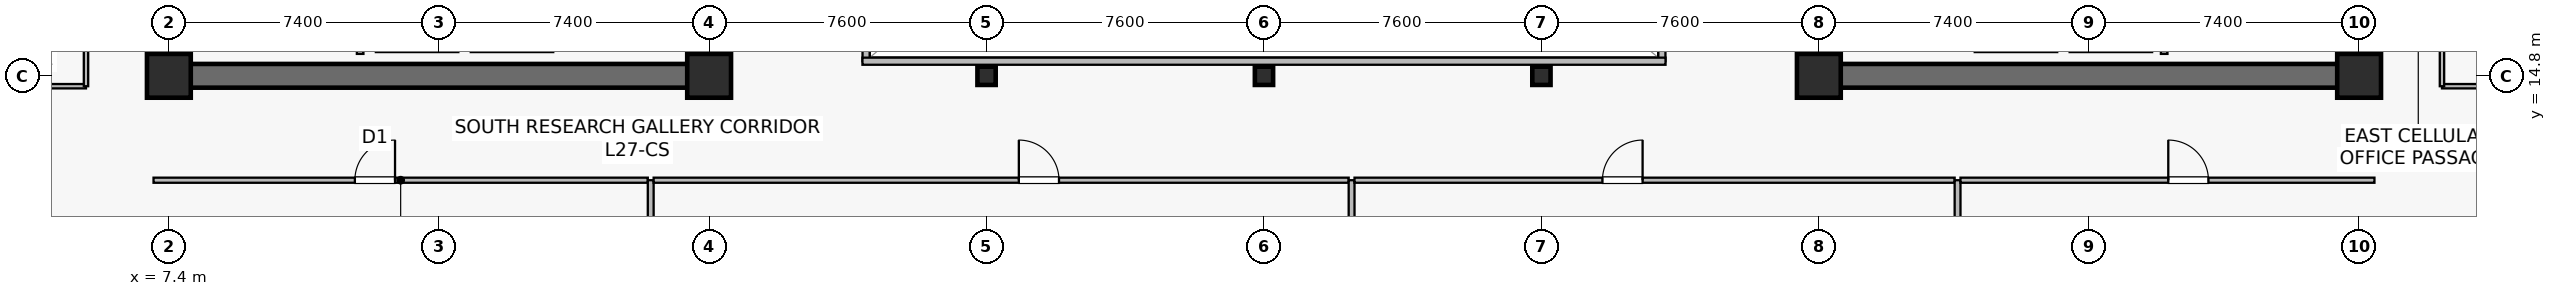
"""IFC4 building model, lengths in metres.
Left out: names, types, materials, properties, quantities, classifications, styles, units other than length and angle.
Written with IfcOpenShell. Run it as: python <this file> out.ifc"""

import sys

from ifc_helpers import new_model, si_unit, direction, frame, frame_2d, origin, origin_2d, place, context, subcontext, project, spatial, rectangle, hollow_rectangle, extrude, source, transform, mapped, element, fill, save


model = new_model("IFC4")
c1 = context("Model", 3, precision=1e-05, world=origin(), true_north=direction((0.0, 1.0)))
c2 = subcontext(c1, "Body", "Model", "MODEL_VIEW")
j1 = project(units=[si_unit("LENGTHUNIT", "METRE"), si_unit("PLANEANGLEUNIT", "RADIAN")], contexts=[c1])
p1 = place(None, origin())
s1 = spatial("IfcSite", under=j1, at=p1, CompositionType="ELEMENT")
p2 = place(p1, origin())
s2 = spatial("IfcBuilding", under=s1, at=p2, CompositionType="ELEMENT")
p3 = place(p2, frame((0.0, 0.0, 113.3)))
s3 = spatial("IfcBuildingStorey", under=s2, at=p3, CompositionType="ELEMENT", Elevation=113.3)
p4 = place(p3, frame((7.075, 14.8, 0.0), z_axis=(0.0, 0.0, 1.0), x_axis=(1.0, 0.0, 0.0)))
e1 = element("IfcWall", 1, at=p4, inside=s3, PredefinedType="SHEAR", context=c2, shape_type="SweptSolid", body=[
    extrude(rectangle(XDim=15.45, YDim=0.65, at=frame_2d((7.725, 0.0))), origin(), (0.0, 0.0, 1.0), 3.79),
])
p5 = place(p3, frame((7.4, 15.125, 0.0), z_axis=(0.0, 0.0, 1.0), x_axis=(0.0, 1.0, 0.0)))
e2 = element("IfcWall", 2, at=p5, inside=s3, PredefinedType="SHEAR", context=c2, shape_type="SweptSolid", body=[
    extrude(rectangle(XDim=18.35, YDim=0.65, at=frame_2d((9.175, 0.0))), origin(), (0.0, 0.0, 1.0), 3.79),
])
p6 = place(p3, frame((22.2, 15.125, 0.0), z_axis=(0.0, 0.0, 1.0), x_axis=(0.0, 1.0, 0.0)))
e3 = element("IfcWall", 3, at=p6, inside=s3, PredefinedType="SHEAR", context=c2, shape_type="SweptSolid", body=[
    extrude(rectangle(XDim=18.35, YDim=0.65, at=frame_2d((9.175, 0.0))), origin(), (0.0, 0.0, 1.0), 3.79),
])
p7 = place(p6, frame((3.425, 0.0, 0.0)))
e4 = element("IfcOpeningElement", 4, at=p7, cuts=e3, PredefinedType="OPENING", context=c2, shape_type="SweptSolid", body=[
    extrude(rectangle(XDim=1.42, YDim=2.2, at=frame_2d((0.71, 1.1))), frame((0.0, 0.335, 0.0), z_axis=(0.0, -1.0, 0.0), x_axis=(1.0, 0.0, 0.0)), (0.0, 0.0, 1.0), 0.67),
])
p8 = place(p3, frame((52.275, 14.8, 0.0), z_axis=(0.0, 0.0, 1.0), x_axis=(1.0, 0.0, 0.0)))
e5 = element("IfcWall", 5, at=p8, inside=s3, PredefinedType="SHEAR", context=c2, shape_type="SweptSolid", body=[
    extrude(rectangle(XDim=15.45, YDim=0.65, at=frame_2d((7.725, 0.0))), origin(), (0.0, 0.0, 1.0), 3.79),
])
p9 = place(p3, frame((52.6, 15.125, 0.0), z_axis=(0.0, 0.0, 1.0), x_axis=(0.0, 1.0, 0.0)))
e6 = element("IfcWall", 6, at=p9, inside=s3, PredefinedType="SHEAR", context=c2, shape_type="SweptSolid", body=[
    extrude(rectangle(XDim=18.35, YDim=0.65, at=frame_2d((9.175, 0.0))), origin(), (0.0, 0.0, 1.0), 3.79),
])
p10 = place(p9, frame((3.425, 0.0, 0.0)))
e7 = element("IfcOpeningElement", 7, at=p10, cuts=e6, PredefinedType="OPENING", context=c2, shape_type="SweptSolid", body=[
    extrude(rectangle(XDim=1.42, YDim=2.2, at=frame_2d((0.71, 1.1))), frame((0.0, 0.335, 0.0), z_axis=(0.0, -1.0, 0.0), x_axis=(1.0, 0.0, 0.0)), (0.0, 0.0, 1.0), 0.67),
])
p11 = place(p3, frame((67.4, 15.125, 0.0), z_axis=(0.0, 0.0, 1.0), x_axis=(0.0, 1.0, 0.0)))
e8 = element("IfcWall", 8, at=p11, inside=s3, PredefinedType="SHEAR", context=c2, shape_type="SweptSolid", body=[
    extrude(rectangle(XDim=18.35, YDim=0.65, at=frame_2d((9.175, 0.0))), origin(), (0.0, 0.0, 1.0), 3.79),
])
m1 = source(origin(), c2, "Body", "SweptSolid", [
    extrude(rectangle(XDim=1.2, YDim=1.2, at=origin_2d()), origin(), (0.0, 0.0, 1.0), 4.1),
])
for number, where, z_axis, x_axis in (
    (9, (7.4, 14.8, 0.0), (0.0, 0.0, 1.0), (1.0, 0.0, 0.0)),
    (10, (22.2, 14.8, 0.0), (0.0, 0.0, 1.0), (1.0, 0.0, 0.0)),
    (11, (52.6, 14.8, 0.0), (0.0, 0.0, 1.0), (1.0, 0.0, 0.0)),
    (12, (67.4, 14.8, 0.0), (0.0, 0.0, 1.0), (1.0, 0.0, 0.0)),
):
    element("IfcColumn", number, at=place(p3, frame(where, z_axis=z_axis, x_axis=x_axis)), inside=s3, PredefinedType="COLUMN", context=c2, shape_type="MappedRepresentation", body=[
        mapped(m1, transform((0.0, 0.0, 0.0), scale=1.0)),
    ])
m2 = source(origin(), c2, "Body", "SweptSolid", [
    extrude(hollow_rectangle(XDim=0.5, YDim=0.5, WallThickness=0.022, at=origin_2d()), origin(), (0.0, 0.0, 1.0), 4.1),
])
for number, where, z_axis, x_axis in (
    (13, (29.8, 14.8, 0.0), (0.0, 0.0, 1.0), (1.0, 0.0, 0.0)),
    (14, (37.4, 14.8, 0.0), (0.0, 0.0, 1.0), (1.0, 0.0, 0.0)),
    (15, (45.0, 14.8, 0.0), (0.0, 0.0, 1.0), (1.0, 0.0, 0.0)),
):
    element("IfcColumn", number, at=place(p3, frame(where, z_axis=z_axis, x_axis=x_axis)), inside=s3, PredefinedType="COLUMN", context=c2, shape_type="MappedRepresentation", body=[
        mapped(m2, transform((0.0, 0.0, 0.0), scale=1.0)),
    ])
p12 = place(p3, frame((13.07, 15.55, 0.0), z_axis=(0.0, 0.0, 1.0), x_axis=(1.0, 0.0, 0.0)))
e16 = element("IfcWall", 16, at=p12, inside=s3, PredefinedType="SOLIDWALL", context=c2, shape_type="SweptSolid", body=[
    extrude(rectangle(XDim=2.26, YDim=0.2, at=frame_2d((1.13, 0.0))), origin(), (0.0, 0.0, 1.0), 3.125),
])
p13 = place(p3, frame((15.67, 15.55, 0.0), z_axis=(0.0, 0.0, 1.0), x_axis=(1.0, 0.0, 0.0)))
e17 = element("IfcWall", 17, at=p13, inside=s3, PredefinedType="SOLIDWALL", context=c2, shape_type="SweptSolid", body=[
    extrude(rectangle(XDim=2.26, YDim=0.2, at=frame_2d((1.13, 0.0))), origin(), (0.0, 0.0, 1.0), 3.79),
])
p14 = place(p3, frame((12.64, 15.4, 0.0), z_axis=(0.0, 0.0, 1.0), x_axis=(0.0, 1.0, 0.0)))
e18 = element("IfcWall", 18, at=p14, inside=s3, PredefinedType="SOLIDWALL", context=c2, shape_type="SweptSolid", body=[
    extrude(rectangle(XDim=2.4, YDim=0.18, at=frame_2d((1.2, 0.0))), origin(), (0.0, 0.0, 1.0), 3.79),
])
p15 = place(p3, frame((59.47, 15.55, 0.0), z_axis=(0.0, 0.0, 1.0), x_axis=(1.0, 0.0, 0.0)))
e19 = element("IfcWall", 19, at=p15, inside=s3, PredefinedType="SOLIDWALL", context=c2, shape_type="SweptSolid", body=[
    extrude(rectangle(XDim=2.26, YDim=0.2, at=frame_2d((1.13, 0.0))), origin(), (0.0, 0.0, 1.0), 3.125),
])
p16 = place(p3, frame((56.87, 15.55, 0.0), z_axis=(0.0, 0.0, 1.0), x_axis=(1.0, 0.0, 0.0)))
e20 = element("IfcWall", 20, at=p16, inside=s3, PredefinedType="SOLIDWALL", context=c2, shape_type="SweptSolid", body=[
    extrude(rectangle(XDim=2.26, YDim=0.2, at=frame_2d((1.13, 0.0))), origin(), (0.0, 0.0, 1.0), 3.79),
])
p17 = place(p3, frame((62.06, 15.4, 0.0), z_axis=(0.0, 0.0, 1.0), x_axis=(0.0, 1.0, 0.0)))
e21 = element("IfcWall", 21, at=p17, inside=s3, PredefinedType="SOLIDWALL", context=c2, shape_type="SweptSolid", body=[
    extrude(rectangle(XDim=2.4, YDim=0.18, at=frame_2d((1.2, 0.0))), origin(), (0.0, 0.0, 1.0), 3.79),
])
p18 = place(p3, frame((26.5, 15.2, 0.0), z_axis=(0.0, 0.0, 1.0), x_axis=(0.0, 1.0, 0.0)))
e22 = element("IfcWall", 22, at=p18, inside=s3, PredefinedType="SOLIDWALL", context=c2, shape_type="SweptSolid", body=[
    extrude(rectangle(XDim=18.2, YDim=0.195, at=frame_2d((9.1, 0.0))), origin(), (0.0, 0.0, 1.0), 3.79),
])
p19 = place(p18, frame((1.8, 0.0, 0.9)))
e23 = element("IfcOpeningElement", 23, at=p19, cuts=e22, PredefinedType="OPENING", context=c2, shape_type="SweptSolid", body=[
    extrude(rectangle(XDim=1.2, YDim=1.35, at=frame_2d((0.6, 0.675))), frame((0.0, 0.107, 0.0), z_axis=(0.0, -1.0, 0.0), x_axis=(1.0, 0.0, 0.0)), (0.0, 0.0, 1.0), 0.215),
])
p20 = place(p18, frame((13.2, 0.0, 0.9)))
e24 = element("IfcOpeningElement", 24, at=p20, cuts=e22, PredefinedType="OPENING", context=c2, shape_type="SweptSolid", body=[
    extrude(rectangle(XDim=1.2, YDim=1.35, at=frame_2d((0.6, 0.675))), frame((0.0, 0.107, 0.0), z_axis=(0.0, -1.0, 0.0), x_axis=(1.0, 0.0, 0.0)), (0.0, 0.0, 1.0), 0.215),
])
p21 = place(p3, frame((48.3, 15.2, 0.0), z_axis=(0.0, 0.0, 1.0), x_axis=(0.0, 1.0, 0.0)))
e25 = element("IfcWall", 25, at=p21, inside=s3, PredefinedType="SOLIDWALL", context=c2, shape_type="SweptSolid", body=[
    extrude(rectangle(XDim=18.2, YDim=0.195, at=frame_2d((9.1, 0.0))), origin(), (0.0, 0.0, 1.0), 3.79),
])
p22 = place(p21, frame((1.8, 0.0, 0.9)))
e26 = element("IfcOpeningElement", 26, at=p22, cuts=e25, PredefinedType="OPENING", context=c2, shape_type="SweptSolid", body=[
    extrude(rectangle(XDim=1.2, YDim=1.35, at=frame_2d((0.6, 0.675))), frame((0.0, 0.107, 0.0), z_axis=(0.0, -1.0, 0.0), x_axis=(1.0, 0.0, 0.0)), (0.0, 0.0, 1.0), 0.215),
])
p23 = place(p21, frame((13.2, 0.0, 0.9)))
e27 = element("IfcOpeningElement", 27, at=p23, cuts=e25, PredefinedType="OPENING", context=c2, shape_type="SweptSolid", body=[
    extrude(rectangle(XDim=1.2, YDim=1.35, at=frame_2d((0.6, 0.675))), frame((0.0, 0.107, 0.0), z_axis=(0.0, -1.0, 0.0), x_axis=(1.0, 0.0, 0.0)), (0.0, 0.0, 1.0), 0.215),
])
p24 = place(p3, frame((26.4, 15.2, 0.0), z_axis=(0.0, 0.0, 1.0), x_axis=(1.0, 0.0, 0.0)))
e28 = element("IfcWall", 28, at=p24, inside=s3, PredefinedType="SOLIDWALL", context=c2, shape_type="SweptSolid", body=[
    extrude(rectangle(XDim=22.0, YDim=0.195, at=frame_2d((11.0, 0.0))), origin(), (0.0, 0.0, 1.0), 3.79),
])
p25 = place(p3, frame((6.98, 11.94, 0.0), z_axis=(0.0, 0.0, 1.0), x_axis=(1.0, 0.0, 0.0)))
e29 = element("IfcWall", 29, at=p25, inside=s3, PredefinedType="PARTITIONING", context=c2, shape_type="SweptSolid", body=[
    extrude(rectangle(XDim=13.54, YDim=0.14, at=frame_2d((6.77, 0.0))), origin(), (0.0, 0.0, 1.0), 3.125),
])
p26 = place(p25, frame((5.516, 0.0, 0.0)))
e30 = element("IfcOpeningElement", 30, at=p26, cuts=e29, PredefinedType="OPENING", context=c2, shape_type="SweptSolid", body=[
    extrude(rectangle(XDim=1.1, YDim=2.18, at=frame_2d((0.55, 1.09))), frame((0.0, 0.08, 0.0), z_axis=(0.0, -1.0, 0.0), x_axis=(1.0, 0.0, 0.0)), (0.0, 0.0, 1.0), 0.16),
])
p27 = place(p3, frame((20.6, 1.41, 0.0), z_axis=(0.0, 0.0, 1.0), x_axis=(0.0, 1.0, 0.0)))
e31 = element("IfcWall", 31, at=p27, inside=s3, PredefinedType="PARTITIONING", context=c2, shape_type="SweptSolid", body=[
    extrude(rectangle(XDim=10.53, YDim=0.16, at=frame_2d((5.265, 0.0))), origin(), (0.0, 0.0, 1.0), 3.075),
])
p28 = place(p3, frame((20.68, 11.94, 0.0), z_axis=(0.0, 0.0, 1.0), x_axis=(1.0, 0.0, 0.0)))
e32 = element("IfcWall", 32, at=p28, inside=s3, PredefinedType="PARTITIONING", context=c2, shape_type="SweptSolid", body=[
    extrude(rectangle(XDim=19.04, YDim=0.14, at=frame_2d((9.52, 0.0))), origin(), (0.0, 0.0, 1.0), 3.125),
])
p29 = place(p28, frame((10.004, 0.0, 0.0)))
e33 = element("IfcOpeningElement", 33, at=p29, cuts=e32, PredefinedType="OPENING", context=c2, shape_type="SweptSolid", body=[
    extrude(rectangle(XDim=1.1, YDim=2.18, at=frame_2d((0.55, 1.09))), frame((0.0, 0.08, 0.0), z_axis=(0.0, -1.0, 0.0), x_axis=(1.0, 0.0, 0.0)), (0.0, 0.0, 1.0), 0.16),
])
p30 = place(p3, frame((39.8, 2.61, 0.0), z_axis=(0.0, 0.0, 1.0), x_axis=(0.0, 1.0, 0.0)))
e34 = element("IfcWall", 34, at=p30, inside=s3, PredefinedType="PARTITIONING", context=c2, shape_type="SweptSolid", body=[
    extrude(rectangle(XDim=9.33, YDim=0.16, at=frame_2d((4.665, 0.0))), origin(), (0.0, 0.0, 1.0), 3.075),
])
p31 = place(p3, frame((39.88, 11.94, 0.0), z_axis=(0.0, 0.0, 1.0), x_axis=(1.0, 0.0, 0.0)))
e35 = element("IfcWall", 35, at=p31, inside=s3, PredefinedType="PARTITIONING", context=c2, shape_type="SweptSolid", body=[
    extrude(rectangle(XDim=16.44, YDim=0.14, at=frame_2d((8.22, 0.0))), origin(), (0.0, 0.0, 1.0), 3.125),
])
p32 = place(p31, frame((6.792, 0.0, 0.0)))
e36 = element("IfcOpeningElement", 36, at=p32, cuts=e35, PredefinedType="OPENING", context=c2, shape_type="SweptSolid", body=[
    extrude(rectangle(XDim=1.1, YDim=2.18, at=frame_2d((0.55, 1.09))), frame((0.0, 0.08, 0.0), z_axis=(0.0, -1.0, 0.0), x_axis=(1.0, 0.0, 0.0)), (0.0, 0.0, 1.0), 0.16),
])
p33 = place(p3, frame((56.4, 1.41, 0.0), z_axis=(0.0, 0.0, 1.0), x_axis=(0.0, 1.0, 0.0)))
e37 = element("IfcWall", 37, at=p33, inside=s3, PredefinedType="PARTITIONING", context=c2, shape_type="SweptSolid", body=[
    extrude(rectangle(XDim=10.53, YDim=0.16, at=frame_2d((5.265, 0.0))), origin(), (0.0, 0.0, 1.0), 3.075),
])
p34 = place(p3, frame((56.48, 11.94, 0.0), z_axis=(0.0, 0.0, 1.0), x_axis=(1.0, 0.0, 0.0)))
e38 = element("IfcWall", 38, at=p34, inside=s3, PredefinedType="PARTITIONING", context=c2, shape_type="SweptSolid", body=[
    extrude(rectangle(XDim=11.34, YDim=0.14, at=frame_2d((5.67, 0.0))), origin(), (0.0, 0.0, 1.0), 3.125),
])
p35 = place(p34, frame((5.692, 0.0, 0.0)))
e39 = element("IfcOpeningElement", 39, at=p35, cuts=e38, PredefinedType="OPENING", context=c2, shape_type="SweptSolid", body=[
    extrude(rectangle(XDim=1.1, YDim=2.18, at=frame_2d((0.55, 1.09))), frame((0.0, 0.08, 0.0), z_axis=(0.0, -1.0, 0.0), x_axis=(1.0, 0.0, 0.0)), (0.0, 0.0, 1.0), 0.16),
])
p36 = place(p3, frame((2.11, 14.515, 0.0), z_axis=(0.0, 0.0, 1.0), x_axis=(1.0, 0.0, 0.0)))
e40 = element("IfcWall", 40, at=p36, inside=s3, PredefinedType="PARTITIONING", context=c2, shape_type="SweptSolid", body=[
    extrude(rectangle(XDim=3.02, YDim=0.12, at=frame_2d((1.51, 0.0))), origin(), (0.0, 0.0, 1.0), 3.79),
])
p37 = place(p3, frame((5.13, 14.515, 0.0), z_axis=(0.0, 0.0, 1.0), x_axis=(0.0, 1.0, 0.0)))
e41 = element("IfcWall", 41, at=p37, inside=s3, PredefinedType="PARTITIONING", context=c2, shape_type="SweptSolid", body=[
    extrude(rectangle(XDim=6.225, YDim=0.12, at=frame_2d((3.113, 0.0))), origin(), (0.0, 0.0, 1.0), 3.79),
])
p38 = place(p37, frame((2.663, 0.0, 0.0)))
e42 = element("IfcOpeningElement", 42, at=p38, cuts=e41, PredefinedType="OPENING", context=c2, shape_type="SweptSolid", body=[
    extrude(rectangle(XDim=0.9, YDim=2.1, at=frame_2d((0.45, 1.05))), frame((0.0, 0.07, 0.0), z_axis=(0.0, -1.0, 0.0), x_axis=(1.0, 0.0, 0.0)), (0.0, 0.0, 1.0), 0.14),
])
p39 = place(p3, frame((69.67, 14.515, 0.0), z_axis=(0.0, 0.0, 1.0), x_axis=(1.0, 0.0, 0.0)))
e43 = element("IfcWall", 43, at=p39, inside=s3, PredefinedType="PARTITIONING", context=c2, shape_type="SweptSolid", body=[
    extrude(rectangle(XDim=3.02, YDim=0.12, at=frame_2d((1.51, 0.0))), origin(), (0.0, 0.0, 1.0), 3.79),
])
p40 = place(p3, frame((69.67, 14.515, 0.0), z_axis=(0.0, 0.0, 1.0), x_axis=(0.0, 1.0, 0.0)))
e44 = element("IfcWall", 44, at=p40, inside=s3, PredefinedType="PARTITIONING", context=c2, shape_type="SweptSolid", body=[
    extrude(rectangle(XDim=10.425, YDim=0.12, at=frame_2d((5.212, 0.0))), origin(), (0.0, 0.0, 1.0), 3.79),
])
p41 = place(p40, frame((4.762, 0.0, 0.0)))
e45 = element("IfcOpeningElement", 45, at=p41, cuts=e44, PredefinedType="OPENING", context=c2, shape_type="SweptSolid", body=[
    extrude(rectangle(XDim=0.9, YDim=2.1, at=frame_2d((0.45, 1.05))), frame((0.0, 0.07, 0.0), z_axis=(0.0, -1.0, 0.0), x_axis=(1.0, 0.0, 0.0)), (0.0, 0.0, 1.0), 0.14),
])
m3 = source(origin(), c2, "Body", "SweptSolid", [
    extrude(rectangle(XDim=1.1, YDim=2.18, at=frame_2d((0.55, 1.09))), frame((0.0, 0.025, 0.0), z_axis=(0.0, -1.0, 0.0), x_axis=(1.0, 0.0, 0.0)), (0.0, 0.0, 1.0), 0.05),
])
p42 = place(p26, origin())
e46 = element("IfcDoor", 46, at=p42, inside=s3, OperationType="SINGLE_SWING_RIGHT", PredefinedType="DOOR", context=c2, shape_type="MappedRepresentation", body=[
    mapped(m3, transform((0.0, 0.0, 0.0), scale=1.0)),
])
fill(e30, e46)
p43 = place(p29, origin())
e47 = element("IfcDoor", 47, at=p43, inside=s3, OperationType="SINGLE_SWING_LEFT", PredefinedType="DOOR", context=c2, shape_type="MappedRepresentation", body=[
    mapped(m3, transform((0.0, 0.0, 0.0), scale=1.0)),
])
fill(e33, e47)
p44 = place(p32, origin())
e48 = element("IfcDoor", 48, at=p44, inside=s3, OperationType="SINGLE_SWING_RIGHT", PredefinedType="DOOR", context=c2, shape_type="MappedRepresentation", body=[
    mapped(m3, transform((0.0, 0.0, 0.0), scale=1.0)),
])
fill(e36, e48)
p45 = place(p35, origin())
e49 = element("IfcDoor", 49, at=p45, inside=s3, OperationType="SINGLE_SWING_LEFT", PredefinedType="DOOR", context=c2, shape_type="MappedRepresentation", body=[
    mapped(m3, transform((0.0, 0.0, 0.0), scale=1.0)),
])
fill(e39, e49)
save(model, sys.argv[1])
